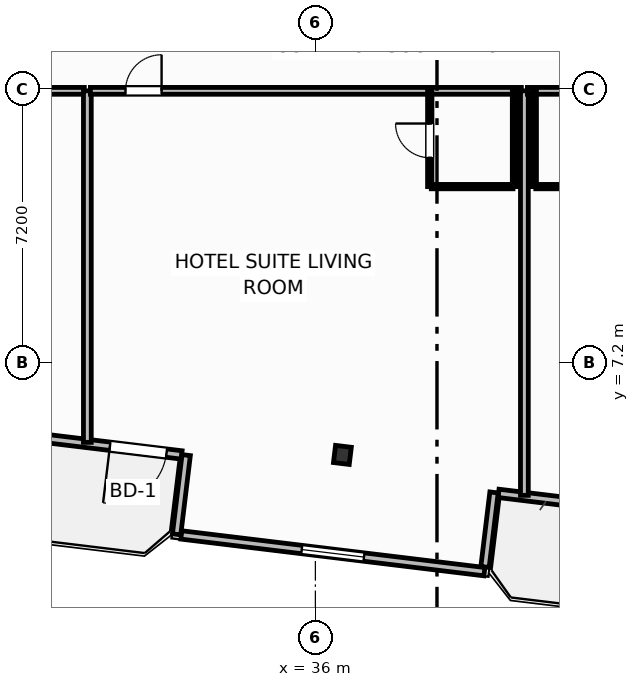
"""IFC4 building model, lengths in metres.
Left out: names, types, materials, properties, quantities, classifications, styles, units other than length and angle.
Written with IfcOpenShell. Run it as: python <this file> out.ifc"""

import sys

from ifc_helpers import new_model, si_unit, direction, frame, frame_2d, origin, origin_2d, place, context, subcontext, project, spatial, rectangle, i_section, extrude, element, fill, save


model = new_model("IFC4")
c1 = context("Model", 3, precision=1e-05, world=origin(), true_north=direction((0.0, 1.0)))
c2 = subcontext(c1, "Body", "Model", "MODEL_VIEW")
j1 = project(units=[si_unit("LENGTHUNIT", "METRE"), si_unit("PLANEANGLEUNIT", "RADIAN")], contexts=[c1])
p1 = place(None, origin())
s1 = spatial("IfcSite", under=j1, at=p1, CompositionType="ELEMENT")
p2 = place(p1, origin())
s2 = spatial("IfcBuilding", under=s1, at=p2, CompositionType="ELEMENT")
p3 = place(p2, frame((0.0, 0.0, 132.8)))
s3 = spatial("IfcBuildingStorey", under=s2, at=p3, CompositionType="ELEMENT", Elevation=132.8)
p4 = place(p3, frame((36.711, 4.77, 0.0), z_axis=(0.0, 0.0, 1.0), x_axis=(0.992732158755, -0.12034475881, 0.0)))
e1 = element("IfcColumn", 1, at=p4, inside=s3, PredefinedType="COLUMN", context=c2, shape_type="SweptSolid", body=[
    extrude(i_section(OverallWidth=0.418, OverallDepth=0.455, WebThickness=0.042, FlangeThickness=0.068, FilletRadius=0.025, at=origin_2d()), origin(), (0.0, 0.0, 1.0), 3.7),
])
p5 = place(p3, frame((32.48, 4.77, 0.0), z_axis=(0.0, 0.0, 1.0), x_axis=(-0.992735402148, 0.120318000826, 0.0)))
e2 = element("IfcWall", 2, at=p5, inside=s3, PredefinedType="SOLIDWALL", context=c2, shape_type="SweptSolid", body=[
    extrude(rectangle(XDim=6.0, YDim=0.22, at=frame_2d((3.0, 0.0))), origin(), (0.0, 0.0, 1.0), 2.73),
])
p6 = place(p5, frame((0.4, 0.0, 0.0)))
e3 = element("IfcOpeningElement", 3, at=p6, cuts=e2, PredefinedType="OPENING", context=c2, shape_type="SweptSolid", body=[
    extrude(rectangle(XDim=1.5, YDim=2.25, at=frame_2d((0.75, 1.125))), frame((0.0, 0.12, 0.0), z_axis=(0.0, -1.0, 0.0), x_axis=(1.0, 0.0, 0.0)), (0.0, 0.0, 1.0), 0.24),
])
p7 = place(p3, frame((46.776, 3.037, 0.0), z_axis=(0.0, 0.0, 1.0), x_axis=(-0.992735402148, 0.120318000826, 0.0)))
e4 = element("IfcWall", 4, at=p7, inside=s3, PredefinedType="SOLIDWALL", context=c2, shape_type="SweptSolid", body=[
    extrude(rectangle(XDim=6.0, YDim=0.22, at=frame_2d((3.0, 0.0))), origin(), (0.0, 0.0, 1.0), 2.73),
])
p8 = place(p7, frame((2.176, 0.0, 0.0)))
e5 = element("IfcOpeningElement", 5, at=p8, cuts=e4, PredefinedType="OPENING", context=c2, shape_type="SweptSolid", body=[
    extrude(rectangle(XDim=1.5, YDim=2.25, at=frame_2d((0.75, 1.125))), frame((0.0, 0.12, 0.0), z_axis=(0.0, -1.0, 0.0), x_axis=(1.0, 0.0, 0.0)), (0.0, 0.0, 1.0), 0.24),
])
p9 = place(p3, frame((32.601, 4.765, 0.0), z_axis=(0.0, 0.0, 1.0), x_axis=(-0.120327895535, -0.992734202874, 0.0)))
e6 = element("IfcWall", 6, at=p9, inside=s3, PredefinedType="SOLIDWALL", context=c2, shape_type="SweptSolid", body=[
    extrude(rectangle(XDim=2.1, YDim=0.22, at=frame_2d((1.05, 0.0))), origin(), (0.0, 0.0, 1.0), 2.73),
])
p10 = place(p3, frame((32.472, 2.665, 0.0), z_axis=(0.0, 0.0, 1.0), x_axis=(0.992734661931, -0.120324108143, 0.0)))
e7 = element("IfcWall", 7, at=p10, inside=s3, PredefinedType="SOLIDWALL", context=c2, shape_type="SweptSolid", body=[
    extrude(rectangle(XDim=8.035, YDim=0.22, at=frame_2d((4.018, 0.0))), origin(), (0.0, 0.0, 1.0), 2.73),
])
p11 = place(p10, frame((3.192, 0.0, 0.8)))
e8 = element("IfcOpeningElement", 8, at=p11, cuts=e7, PredefinedType="OPENING", context=c2, shape_type="SweptSolid", body=[
    extrude(rectangle(XDim=1.65, YDim=1.65, at=frame_2d((0.825, 0.825))), frame((0.0, 0.12, 0.0), z_axis=(0.0, -1.0, 0.0), x_axis=(1.0, 0.0, 0.0)), (0.0, 0.0, 1.0), 0.24),
])
p12 = place(p3, frame((40.464, 1.822, 0.0), z_axis=(0.0, 0.0, 1.0), x_axis=(0.120275992932, 0.992740492538, 0.0)))
e9 = element("IfcWall", 9, at=p12, inside=s3, PredefinedType="SOLIDWALL", context=c2, shape_type="SweptSolid", body=[
    extrude(rectangle(XDim=1.975, YDim=0.22, at=frame_2d((0.988, 0.0))), origin(), (0.0, 0.0, 1.0), 2.73),
])
p13 = place(p3, frame((18.58, 14.35, 0.0), z_axis=(0.0, 0.0, 1.0), x_axis=(1.0, 0.0, 0.0)))
e10 = element("IfcWall", 10, at=p13, inside=s3, PredefinedType="PARTITIONING", context=c2, shape_type="SweptSolid", body=[
    extrude(rectangle(XDim=11.34, YDim=0.18, at=frame_2d((5.67, 0.0))), origin(), (0.0, 0.0, 1.0), 3.45),
])
p14 = place(p13, frame((3.313, 0.0, 0.0)))
e11 = element("IfcOpeningElement", 11, at=p14, cuts=e10, PredefinedType="OPENING", context=c2, shape_type="SweptSolid", body=[
    extrude(rectangle(XDim=0.95, YDim=2.15, at=frame_2d((0.475, 1.075))), frame((0.0, 0.1, 0.0), z_axis=(0.0, -1.0, 0.0), x_axis=(1.0, 0.0, 0.0)), (0.0, 0.0, 1.0), 0.2),
])
p15 = place(p3, frame((30.0, 5.1, 0.0), z_axis=(0.0, 0.0, 1.0), x_axis=(0.0, 1.0, 0.0)))
e12 = element("IfcWall", 12, at=p15, inside=s3, PredefinedType="PARTITIONING", context=c2, shape_type="SweptSolid", body=[
    extrude(rectangle(XDim=9.25, YDim=0.205, at=frame_2d((4.625, 0.0))), origin(), (0.0, 0.0, 1.0), 3.45),
])
p16 = place(p3, frame((30.08, 14.35, 0.0), z_axis=(0.0, 0.0, 1.0), x_axis=(1.0, 0.0, 0.0)))
e13 = element("IfcWall", 13, at=p16, inside=s3, PredefinedType="PARTITIONING", context=c2, shape_type="SweptSolid", body=[
    extrude(rectangle(XDim=11.34, YDim=0.18, at=frame_2d((5.67, 0.0))), origin(), (0.0, 0.0, 1.0), 3.45),
])
p17 = place(p16, frame((0.923, 0.0, 0.0)))
e14 = element("IfcOpeningElement", 14, at=p17, cuts=e13, PredefinedType="OPENING", context=c2, shape_type="SweptSolid", body=[
    extrude(rectangle(XDim=0.95, YDim=2.15, at=frame_2d((0.475, 1.075))), frame((0.0, 0.1, 0.0), z_axis=(0.0, -1.0, 0.0), x_axis=(1.0, 0.0, 0.0)), (0.0, 0.0, 1.0), 0.2),
])
p18 = place(p3, frame((39.05, 11.83, 0.0), z_axis=(0.0, 0.0, 1.0), x_axis=(1.0, 0.0, 0.0)))
e15 = element("IfcWall", 15, at=p18, inside=s3, PredefinedType="PARTITIONING", context=c2, shape_type="SweptSolid", body=[
    extrude(rectangle(XDim=2.15, YDim=0.115, at=frame_2d((1.075, 0.0))), origin(), (0.0, 0.0, 1.0), 3.45),
])
p19 = place(p3, frame((39.01, 11.83, 0.0), z_axis=(0.0, 0.0, 1.0), x_axis=(0.0, 1.0, 0.0)))
e16 = element("IfcWall", 16, at=p19, inside=s3, PredefinedType="PARTITIONING", context=c2, shape_type="SweptSolid", body=[
    extrude(rectangle(XDim=2.52, YDim=0.115, at=frame_2d((1.26, 0.0))), origin(), (0.0, 0.0, 1.0), 3.45),
])
p20 = place(p19, frame((0.76, 0.0, 0.0)))
e17 = element("IfcOpeningElement", 17, at=p20, cuts=e16, PredefinedType="OPENING", context=c2, shape_type="SweptSolid", body=[
    extrude(rectangle(XDim=0.9, YDim=2.05, at=frame_2d((0.45, 1.025))), frame((0.0, 0.067, 0.0), z_axis=(0.0, -1.0, 0.0), x_axis=(1.0, 0.0, 0.0)), (0.0, 0.0, 1.0), 0.135),
])
p21 = place(p3, frame((41.24, 11.83, 0.0), z_axis=(0.0, 0.0, 1.0), x_axis=(0.0, 1.0, 0.0)))
e18 = element("IfcWall", 18, at=p21, inside=s3, PredefinedType="PARTITIONING", context=c2, shape_type="SweptSolid", body=[
    extrude(rectangle(XDim=2.52, YDim=0.115, at=frame_2d((1.26, 0.0))), origin(), (0.0, 0.0, 1.0), 3.45),
])
p22 = place(p3, frame((41.5, 3.706, 0.0), z_axis=(0.0, 0.0, 1.0), x_axis=(0.0, 1.0, 0.0)))
e19 = element("IfcWall", 19, at=p22, inside=s3, PredefinedType="PARTITIONING", context=c2, shape_type="SweptSolid", body=[
    extrude(rectangle(XDim=10.644, YDim=0.205, at=frame_2d((5.322, 0.0))), origin(), (0.0, 0.0, 1.0), 3.45),
])
p23 = place(p3, frame((41.58, 14.35, 0.0), z_axis=(0.0, 0.0, 1.0), x_axis=(1.0, 0.0, 0.0)))
e20 = element("IfcWall", 20, at=p23, inside=s3, PredefinedType="PARTITIONING", context=c2, shape_type="SweptSolid", body=[
    extrude(rectangle(XDim=11.34, YDim=0.18, at=frame_2d((5.67, 0.0))), origin(), (0.0, 0.0, 1.0), 3.45),
])
p24 = place(p23, frame((3.313, 0.0, 0.0)))
e21 = element("IfcOpeningElement", 21, at=p24, cuts=e20, PredefinedType="OPENING", context=c2, shape_type="SweptSolid", body=[
    extrude(rectangle(XDim=0.95, YDim=2.15, at=frame_2d((0.475, 1.075))), frame((0.0, 0.1, 0.0), z_axis=(0.0, -1.0, 0.0), x_axis=(1.0, 0.0, 0.0)), (0.0, 0.0, 1.0), 0.2),
])
p25 = place(p3, frame((41.8, 11.83, 0.0), z_axis=(0.0, 0.0, 1.0), x_axis=(1.0, 0.0, 0.0)))
e22 = element("IfcWall", 22, at=p25, inside=s3, PredefinedType="PARTITIONING", context=c2, shape_type="SweptSolid", body=[
    extrude(rectangle(XDim=2.15, YDim=0.115, at=frame_2d((1.075, 0.0))), origin(), (0.0, 0.0, 1.0), 3.45),
])
p26 = place(p3, frame((41.76, 11.83, 0.0), z_axis=(0.0, 0.0, 1.0), x_axis=(0.0, 1.0, 0.0)))
e23 = element("IfcWall", 23, at=p26, inside=s3, PredefinedType="PARTITIONING", context=c2, shape_type="SweptSolid", body=[
    extrude(rectangle(XDim=2.52, YDim=0.115, at=frame_2d((1.26, 0.0))), origin(), (0.0, 0.0, 1.0), 3.45),
])
p27 = place(p6, origin())
e24 = element("IfcDoor", 24, at=p27, inside=s3, OperationType="SINGLE_SWING_RIGHT", PredefinedType="DOOR", context=c2, shape_type="SweptSolid", body=[
    extrude(rectangle(XDim=1.5, YDim=2.25, at=frame_2d((0.75, 1.125))), frame((0.0, 0.025, 0.0), z_axis=(0.0, -1.0, 0.0), x_axis=(1.0, 0.0, 0.0)), (0.0, 0.0, 1.0), 0.05),
])
fill(e3, e24)
p28 = place(p11, origin())
e25 = element("IfcWindow", 25, at=p28, inside=s3, PartitioningType="SINGLE_PANEL", PredefinedType="WINDOW", context=c2, shape_type="SweptSolid", body=[
    extrude(rectangle(XDim=1.65, YDim=1.65, at=frame_2d((0.825, 0.825))), frame((0.0, 0.03, 0.0), z_axis=(0.0, -1.0, 0.0), x_axis=(1.0, 0.0, 0.0)), (0.0, 0.0, 1.0), 0.06),
])
fill(e8, e25)
p29 = place(p17, origin())
e26 = element("IfcDoor", 26, at=p29, inside=s3, OperationType="SINGLE_SWING_RIGHT", PredefinedType="DOOR", context=c2, shape_type="SweptSolid", body=[
    extrude(rectangle(XDim=0.95, YDim=2.15, at=frame_2d((0.475, 1.075))), frame((0.0, 0.025, 0.0), z_axis=(0.0, -1.0, 0.0), x_axis=(1.0, 0.0, 0.0)), (0.0, 0.0, 1.0), 0.05),
])
fill(e14, e26)
p30 = place(p20, origin())
e27 = element("IfcDoor", 27, at=p30, inside=s3, OperationType="SINGLE_SWING_RIGHT", PredefinedType="DOOR", context=c2, shape_type="SweptSolid", body=[
    extrude(rectangle(XDim=0.9, YDim=2.05, at=frame_2d((0.45, 1.025))), frame((0.0, 0.025, 0.0), z_axis=(0.0, -1.0, 0.0), x_axis=(1.0, 0.0, 0.0)), (0.0, 0.0, 1.0), 0.05),
])
fill(e17, e27)
save(model, sys.argv[1])
